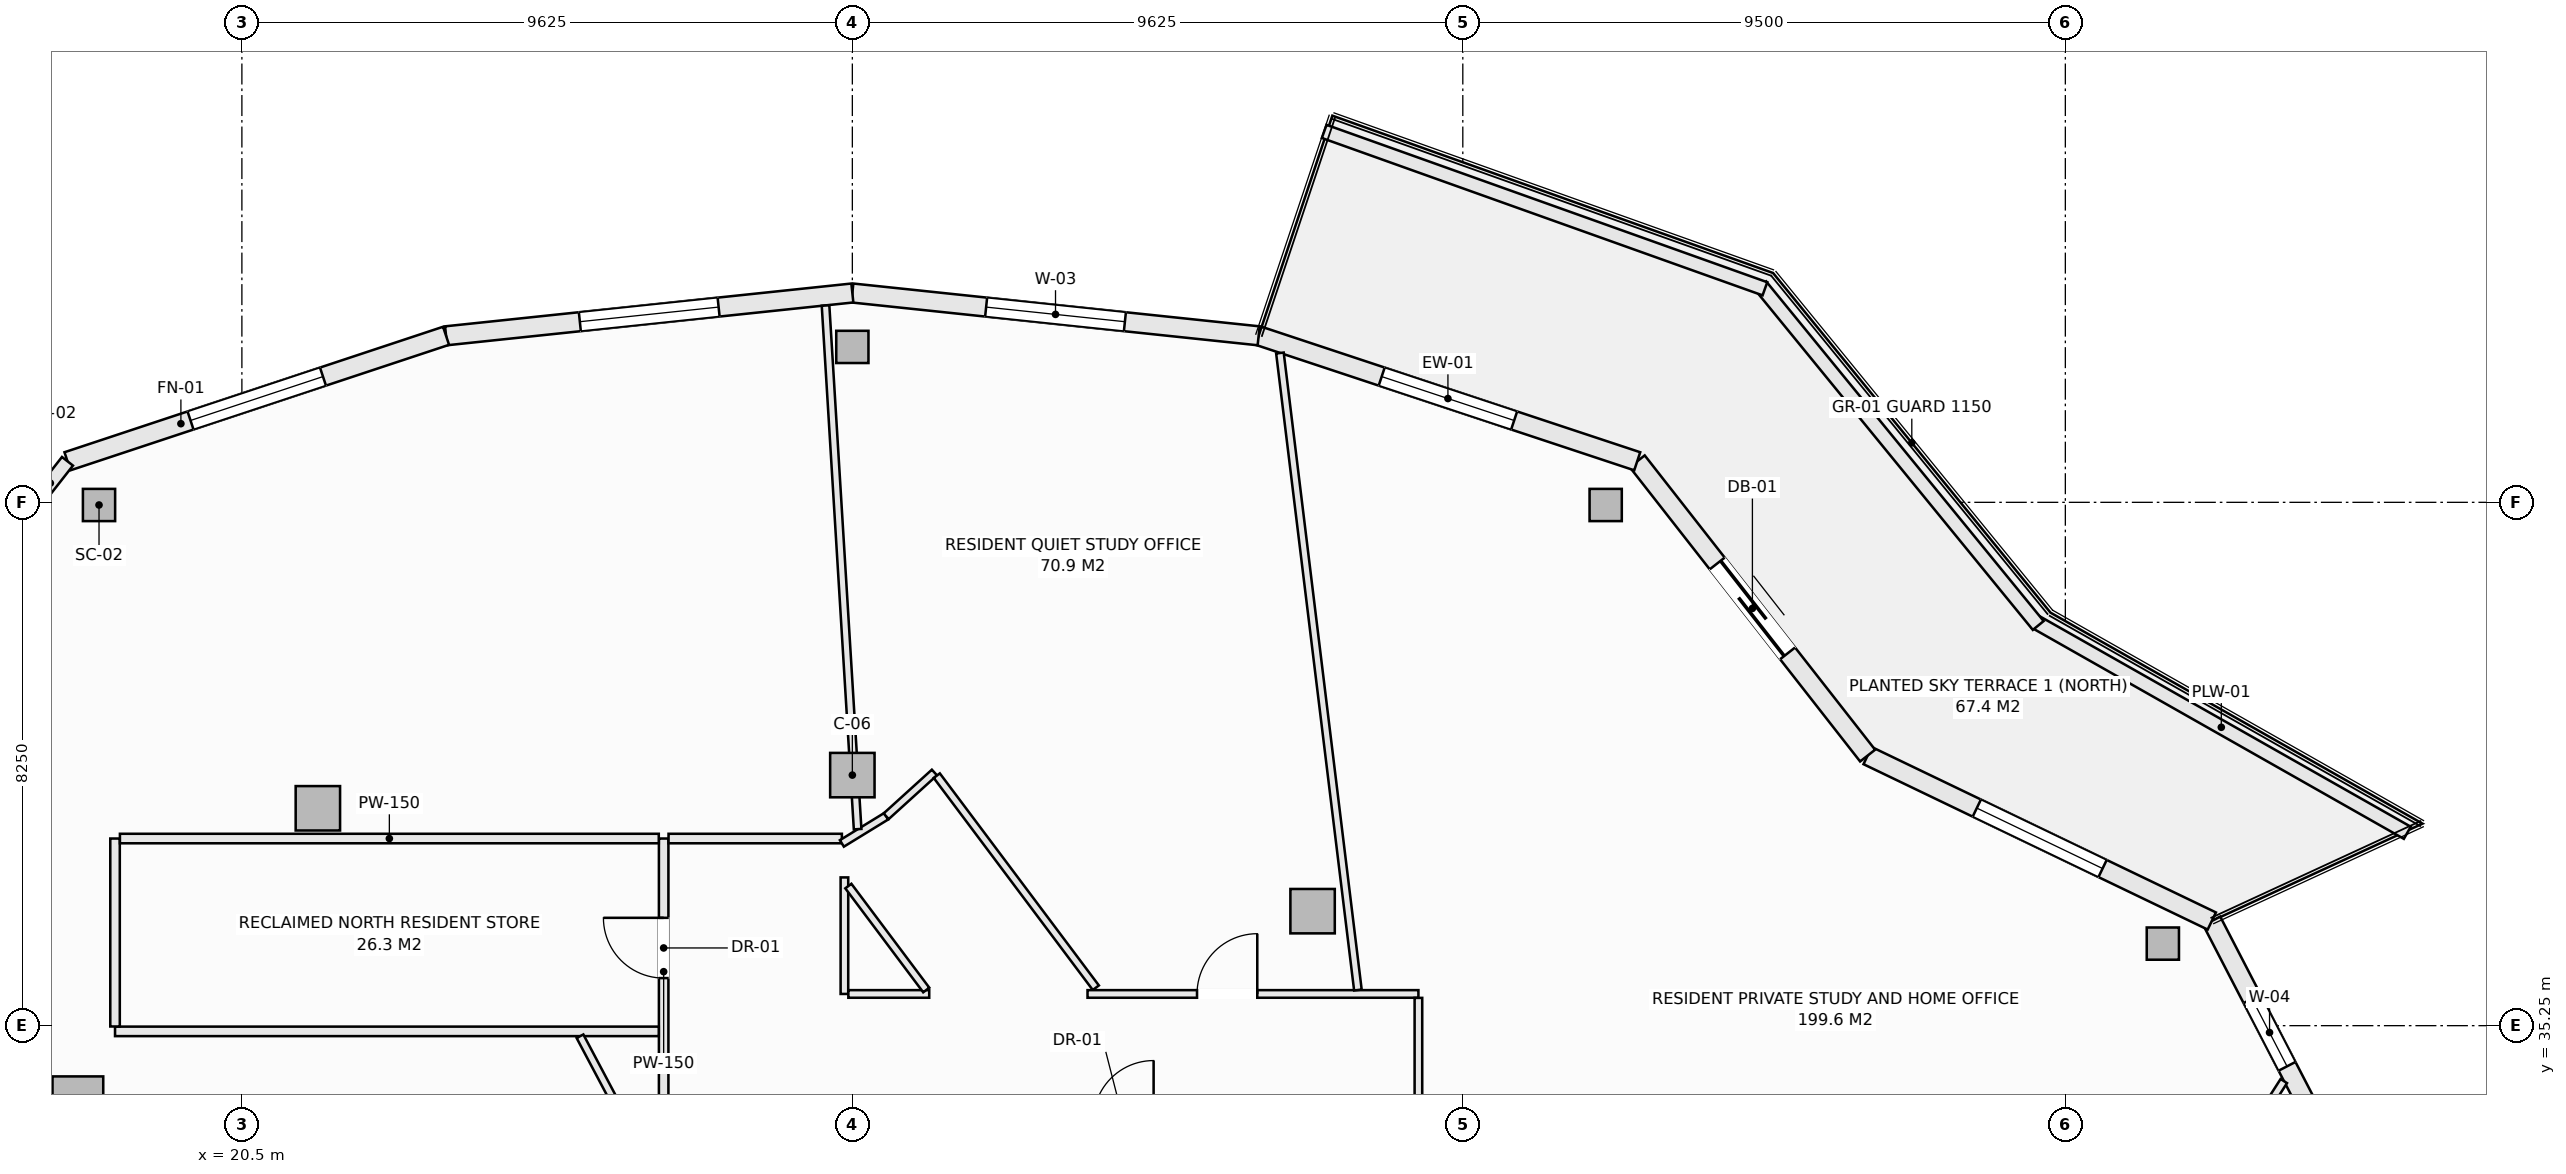
"""IFC4 building model, lengths in metres.
Left out: names, types, materials, properties, quantities, classifications, styles, units other than length and angle.
Written with IfcOpenShell. Run it as: python <this file> out.ifc"""

import sys

from ifc_helpers import new_model, si_unit, direction, frame, frame_2d, origin, origin_2d, place, context, subcontext, project, spatial, rectangle, hollow_rectangle, extrude, element, fill, save


model = new_model("IFC4")
c1 = context("Model", 3, precision=1e-05, world=origin(), true_north=direction((0.0, 1.0)))
c2 = subcontext(c1, "Body", "Model", "MODEL_VIEW")
j1 = project(units=[si_unit("LENGTHUNIT", "METRE"), si_unit("PLANEANGLEUNIT", "RADIAN")], contexts=[c1])
p1 = place(None, origin())
s1 = spatial("IfcSite", under=j1, at=p1, CompositionType="ELEMENT")
p2 = place(p1, origin())
s2 = spatial("IfcBuilding", under=s1, at=p2, CompositionType="ELEMENT")
p3 = place(p2, frame((0.0, 0.0, 212.9)))
s3 = spatial("IfcBuildingStorey", under=s2, at=p3, CompositionType="ELEMENT", Elevation=212.9)
for number, where, z_axis, x_axis in (
    (1, (50.787, 36.544, -0.27), (0.0, 0.0, 1.0), (1.0, 0.0, 0.0)),
    (2, (42.003, 43.458, -0.27), (0.0, 0.0, 1.0), (1.0, 0.0, 0.0)),
    (3, (30.125, 45.95, -0.27), (0.0, 0.0, 1.0), (1.0, 0.0, 0.0)),
    (4, (18.247, 43.458, -0.27), (0.0, 0.0, 1.0), (1.0, 0.0, 0.0)),
):
    element("IfcColumn", number, at=place(p3, frame(where, z_axis=z_axis, x_axis=x_axis)), inside=s3, PredefinedType="COLUMN", context=c2, shape_type="SweptSolid", body=[
        extrude(hollow_rectangle(XDim=0.508, YDim=0.508, WallThickness=0.019, at=origin_2d()), origin(), (0.0, 0.0, 1.0), 3.3),
    ])
for number, where, z_axis, x_axis in (
    (5, (37.382, 37.055, -0.27), (0.0, 0.0, 1.0), (1.0, 0.0, 0.0)),
    (6, (30.125, 39.2, -0.27), (0.0, 0.0, 1.0), (1.0, 0.0, 0.0)),
    (7, (21.698, 38.677, -0.27), (0.0, 0.0, 1.0), (1.0, 0.0, 0.0)),
):
    element("IfcColumn", number, at=place(p3, frame(where, z_axis=z_axis, x_axis=x_axis)), inside=s3, PredefinedType="COLUMN", context=c2, shape_type="SweptSolid", body=[
        extrude(rectangle(XDim=0.7, YDim=0.7, at=origin_2d()), origin(), (0.0, 0.0, 1.0), 3.3),
    ])
p4 = place(p3, frame((17.914, 34.05, -0.27), z_axis=(0.0, 0.0, 1.0), x_axis=(1.0, 0.0, 0.0)))
e8 = element("IfcColumn", 8, at=p4, inside=s3, PredefinedType="PILASTER", context=c2, shape_type="SweptSolid", body=[
    extrude(rectangle(XDim=0.8, YDim=0.8, at=origin_2d()), origin(), (0.0, 0.0, 1.0), 3.3),
])
p5 = place(p3, frame((51.559, 36.9, 0.0), z_axis=(0.0, 0.0, 1.0), x_axis=(0.459808219482, -0.888018243786, 0.0)))
e9 = element("IfcWall", 9, at=p5, inside=s3, PredefinedType="SOLIDWALL", context=c2, shape_type="SweptSolid", body=[
    extrude(rectangle(XDim=5.378, YDim=0.3, at=frame_2d((2.689, 0.0))), origin(), (0.0, 0.0, 1.0), 2.605),
])
p6 = place(p5, frame((1.38, 0.0, 0.72)))
e10 = element("IfcOpeningElement", 10, at=p6, cuts=e9, PredefinedType="OPENING", context=c2, shape_type="SweptSolid", body=[
    extrude(rectangle(XDim=1.2, YDim=1.65, at=frame_2d((0.6, 0.825))), frame((0.0, 0.16, 0.0), z_axis=(0.0, -1.0, 0.0), x_axis=(1.0, 0.0, 0.0)), (0.0, 0.0, 1.0), 0.32),
])
p7 = place(p3, frame((46.133, 39.507, 0.0), z_axis=(0.0, 0.0, 1.0), x_axis=(0.901348331142, -0.433094892545, 0.0)))
e11 = element("IfcWall", 11, at=p7, inside=s3, PredefinedType="SOLIDWALL", context=c2, shape_type="SweptSolid", body=[
    extrude(rectangle(XDim=6.021, YDim=0.3, at=frame_2d((3.01, 0.0))), origin(), (0.0, 0.0, 1.0), 2.605),
])
p8 = place(p7, frame((1.91, 0.0, 0.72)))
e12 = element("IfcOpeningElement", 12, at=p8, cuts=e11, PredefinedType="OPENING", context=c2, shape_type="SweptSolid", body=[
    extrude(rectangle(XDim=2.2, YDim=1.65, at=frame_2d((1.1, 0.825))), frame((0.0, 0.16, 0.0), z_axis=(0.0, -1.0, 0.0), x_axis=(1.0, 0.0, 0.0)), (0.0, 0.0, 1.0), 0.32),
])
p9 = place(p3, frame((42.5, 44.147, 0.0), z_axis=(0.0, 0.0, 1.0), x_axis=(0.616450126935, -0.787393955401, 0.0)))
e13 = element("IfcWall", 13, at=p9, inside=s3, PredefinedType="SOLIDWALL", context=c2, shape_type="SweptSolid", body=[
    extrude(rectangle(XDim=5.893, YDim=0.3, at=frame_2d((2.946, 0.0))), origin(), (0.0, 0.0, 1.0), 2.605),
])
p10 = place(p9, frame((2.046, 0.0, 0.0)))
e14 = element("IfcOpeningElement", 14, at=p10, cuts=e13, PredefinedType="OPENING", context=c2, shape_type="SweptSolid", body=[
    extrude(rectangle(XDim=1.8, YDim=2.25, at=frame_2d((0.9, 1.125))), frame((0.0, 0.16, 0.0), z_axis=(0.0, -1.0, 0.0), x_axis=(1.0, 0.0, 0.0)), (0.0, 0.0, 1.0), 0.32),
])
p11 = place(p3, frame((36.531, 46.125, 0.0), z_axis=(0.0, 0.0, 1.0), x_axis=(0.949240877604, -0.314550085495, 0.0)))
e15 = element("IfcWall", 15, at=p11, inside=s3, PredefinedType="SOLIDWALL", context=c2, shape_type="SweptSolid", body=[
    extrude(rectangle(XDim=6.288, YDim=0.3, at=frame_2d((3.144, 0.0))), origin(), (0.0, 0.0, 1.0), 2.605),
])
p12 = place(p11, frame((2.044, 0.0, 0.72)))
e16 = element("IfcOpeningElement", 16, at=p12, cuts=e15, PredefinedType="OPENING", context=c2, shape_type="SweptSolid", body=[
    extrude(rectangle(XDim=2.2, YDim=1.65, at=frame_2d((1.1, 0.825))), frame((0.0, 0.16, 0.0), z_axis=(0.0, -1.0, 0.0), x_axis=(1.0, 0.0, 0.0)), (0.0, 0.0, 1.0), 0.32),
])
p13 = place(p3, frame((30.125, 46.8, 0.0), z_axis=(0.0, 0.0, 1.0), x_axis=(0.994497142298, -0.104763705363, 0.0)))
e17 = element("IfcWall", 17, at=p13, inside=s3, PredefinedType="SOLIDWALL", context=c2, shape_type="SweptSolid", body=[
    extrude(rectangle(XDim=6.441, YDim=0.3, at=frame_2d((3.221, 0.0))), origin(), (0.0, 0.0, 1.0), 2.605),
])
p14 = place(p13, frame((2.121, 0.0, 0.72)))
e18 = element("IfcOpeningElement", 18, at=p14, cuts=e17, PredefinedType="OPENING", context=c2, shape_type="SweptSolid", body=[
    extrude(rectangle(XDim=2.2, YDim=1.65, at=frame_2d((1.1, 0.825))), frame((0.0, 0.16, 0.0), z_axis=(0.0, -1.0, 0.0), x_axis=(1.0, 0.0, 0.0)), (0.0, 0.0, 1.0), 0.32),
])
p15 = place(p3, frame((23.719, 46.125, 0.0), z_axis=(0.0, 0.0, 1.0), x_axis=(0.994497142298, 0.104763705363, 0.0)))
e19 = element("IfcWall", 19, at=p15, inside=s3, PredefinedType="SOLIDWALL", context=c2, shape_type="SweptSolid", body=[
    extrude(rectangle(XDim=6.441, YDim=0.3, at=frame_2d((3.221, 0.0))), origin(), (0.0, 0.0, 1.0), 2.605),
])
p16 = place(p15, frame((2.121, 0.0, 0.72)))
e20 = element("IfcOpeningElement", 20, at=p16, cuts=e19, PredefinedType="OPENING", context=c2, shape_type="SweptSolid", body=[
    extrude(rectangle(XDim=2.2, YDim=1.65, at=frame_2d((1.1, 0.825))), frame((0.0, 0.16, 0.0), z_axis=(0.0, -1.0, 0.0), x_axis=(1.0, 0.0, 0.0)), (0.0, 0.0, 1.0), 0.32),
])
p17 = place(p3, frame((17.75, 44.147, 0.0), z_axis=(0.0, 0.0, 1.0), x_axis=(0.949240877604, 0.314550085495, 0.0)))
e21 = element("IfcWall", 21, at=p17, inside=s3, PredefinedType="SOLIDWALL", context=c2, shape_type="SweptSolid", body=[
    extrude(rectangle(XDim=6.288, YDim=0.3, at=frame_2d((3.144, 0.0))), origin(), (0.0, 0.0, 1.0), 2.605),
])
p18 = place(p17, frame((2.044, 0.0, 0.72)))
e22 = element("IfcOpeningElement", 22, at=p18, cuts=e21, PredefinedType="OPENING", context=c2, shape_type="SweptSolid", body=[
    extrude(rectangle(XDim=2.2, YDim=1.65, at=frame_2d((1.1, 0.825))), frame((0.0, 0.16, 0.0), z_axis=(0.0, -1.0, 0.0), x_axis=(1.0, 0.0, 0.0)), (0.0, 0.0, 1.0), 0.32),
])
p19 = place(p3, frame((17.21, 43.458, 0.0), z_axis=(0.0, 0.0, 1.0), x_axis=(0.616466126167, 0.787381429352, 0.0)))
e23 = element("IfcWall", 23, at=p19, inside=s3, PredefinedType="SOLIDWALL", context=c2, shape_type="SweptSolid", body=[
    extrude(rectangle(XDim=0.876, YDim=0.22, at=frame_2d((0.438, 0.0))), origin(), (0.0, 0.0, 1.0), 2.605),
])
p20 = place(p3, frame((48.776, 41.617, 0.0), z_axis=(0.0, 0.0, 1.0), x_axis=(0.869860619267, -0.493297580623, 0.0)))
e24 = element("IfcWall", 24, at=p20, inside=s3, PredefinedType="PARAPET", context=c2, shape_type="SweptSolid", body=[
    extrude(rectangle(XDim=6.743, YDim=0.22, at=frame_2d((3.371, 0.0))), origin(), (0.0, 0.0, 1.0), 0.52),
])
p21 = place(p3, frame((44.448, 46.913, 0.0), z_axis=(0.0, 0.0, 1.0), x_axis=(0.632697312147, -0.774399193699, 0.0)))
e25 = element("IfcWall", 25, at=p21, inside=s3, PredefinedType="PARAPET", context=c2, shape_type="SweptSolid", body=[
    extrude(rectangle(XDim=6.914, YDim=0.22, at=frame_2d((3.457, 0.0))), origin(), (0.0, 0.0, 1.0), 0.52),
])
p22 = place(p3, frame((37.565, 49.347, 0.0), z_axis=(0.0, 0.0, 1.0), x_axis=(0.941780086523, -0.336229488042, 0.0)))
e26 = element("IfcWall", 26, at=p22, inside=s3, PredefinedType="PARAPET", context=c2, shape_type="SweptSolid", body=[
    extrude(rectangle(XDim=7.378, YDim=0.22, at=frame_2d((3.689, 0.0))), origin(), (0.0, 0.0, 1.0), 0.52),
])
p23 = place(p3, frame((27.15, 34.002, 0.0), z_axis=(0.0, 0.0, 1.0), x_axis=(0.0, 1.0, 0.0)))
e27 = element("IfcWall", 27, at=p23, inside=s3, PredefinedType="PARTITIONING", context=c2, shape_type="SweptSolid", body=[
    extrude(rectangle(XDim=4.198, YDim=0.15, at=frame_2d((2.099, 0.0))), origin(), (0.0, 0.0, 1.0), 3.03),
])
p24 = place(p23, frame((1.998, 0.0, 0.0)))
e28 = element("IfcOpeningElement", 28, at=p24, cuts=e27, PredefinedType="OPENING", context=c2, shape_type="SweptSolid", body=[
    extrude(rectangle(XDim=0.95, YDim=2.1, at=frame_2d((0.475, 1.05))), frame((0.0, 0.085, 0.0), z_axis=(0.0, -1.0, 0.0), x_axis=(1.0, 0.0, 0.0)), (0.0, 0.0, 1.0), 0.17),
])
p25 = place(p3, frame((30.0, 35.75, 0.0), z_axis=(0.0, 0.0, 1.0), x_axis=(0.0, 1.0, 0.0)))
e29 = element("IfcWall", 29, at=p25, inside=s3, PredefinedType="PARTITIONING", context=c2, shape_type="SweptSolid", body=[
    extrude(rectangle(XDim=1.837, YDim=0.12, at=frame_2d((0.918, 0.0))), origin(), (0.0, 0.0, 1.0), 3.03),
])
p26 = place(p3, frame((18.5, 35.16, 0.0), z_axis=(0.0, 0.0, 1.0), x_axis=(1.0, 0.0, 0.0)))
e30 = element("IfcWall", 30, at=p26, inside=s3, PredefinedType="PARTITIONING", context=c2, shape_type="SweptSolid", body=[
    extrude(rectangle(XDim=8.573, YDim=0.15, at=frame_2d((4.287, 0.0))), origin(), (0.0, 0.0, 1.0), 3.03),
])
p27 = place(p3, frame((18.5, 35.237, 0.0), z_axis=(0.0, 0.0, 1.0), x_axis=(0.0, 1.0, 0.0)))
e31 = element("IfcWall", 31, at=p27, inside=s3, PredefinedType="PARTITIONING", context=c2, shape_type="SweptSolid", body=[
    extrude(rectangle(XDim=2.963, YDim=0.15, at=frame_2d((1.481, 0.0))), origin(), (0.0, 0.0, 1.0), 3.03),
])
p28 = place(p3, frame((18.577, 38.2, 0.0), z_axis=(0.0, 0.0, 1.0), x_axis=(1.0, 0.0, 0.0)))
e32 = element("IfcWall", 32, at=p28, inside=s3, PredefinedType="PARTITIONING", context=c2, shape_type="SweptSolid", body=[
    extrude(rectangle(XDim=8.496, YDim=0.15, at=frame_2d((4.248, 0.0))), origin(), (0.0, 0.0, 1.0), 3.03),
])
p29 = place(p3, frame((27.227, 38.2, 0.0), z_axis=(0.0, 0.0, 1.0), x_axis=(1.0, 0.0, 0.0)))
e33 = element("IfcWall", 33, at=p29, inside=s3, PredefinedType="PARTITIONING", context=c2, shape_type="SweptSolid", body=[
    extrude(rectangle(XDim=2.733, YDim=0.15, at=frame_2d((1.366, 0.0))), origin(), (0.0, 0.0, 1.0), 3.03),
])
p30 = place(p3, frame((29.96, 38.123, 0.0), z_axis=(0.0, 0.0, 1.0), x_axis=(0.852506956574, 0.522715877885, 0.0)))
e34 = element("IfcWall", 34, at=p30, inside=s3, PredefinedType="PARTITIONING", context=c2, shape_type="SweptSolid", body=[
    extrude(rectangle(XDim=0.819, YDim=0.12, at=frame_2d((0.409, 0.0))), origin(), (0.0, 0.0, 1.0), 3.03),
])
p31 = place(p3, frame((30.658, 38.551, 0.0), z_axis=(0.0, 0.0, 1.0), x_axis=(0.74084279818, 0.671678456097, 0.0)))
e35 = element("IfcWall", 35, at=p31, inside=s3, PredefinedType="PARTITIONING", context=c2, shape_type="SweptSolid", body=[
    extrude(rectangle(XDim=1.027, YDim=0.12, at=frame_2d((0.514, 0.0))), origin(), (0.0, 0.0, 1.0), 3.03),
])
p32 = place(p3, frame((31.456, 39.191, 0.0), z_axis=(0.0, 0.0, 1.0), x_axis=(0.600056078533, -0.799957938029, 0.0)))
e36 = element("IfcWall", 36, at=p32, inside=s3, PredefinedType="PARTITIONING", context=c2, shape_type="SweptSolid", body=[
    extrude(rectangle(XDim=4.179, YDim=0.12, at=frame_2d((2.09, 0.0))), origin(), (0.0, 0.0, 1.0), 2.478),
])
p33 = place(p3, frame((30.062, 35.75, 0.0), z_axis=(0.0, 0.0, 1.0), x_axis=(1.0, 0.0, 0.0)))
e37 = element("IfcWall", 37, at=p33, inside=s3, PredefinedType="PARTITIONING", context=c2, shape_type="SweptSolid", body=[
    extrude(rectangle(XDim=1.275, YDim=0.12, at=frame_2d((0.637, 0.0))), origin(), (0.0, 0.0, 1.0), 3.03),
])
p34 = place(p3, frame((33.833, 35.75, 0.0), z_axis=(0.0, 0.0, 1.0), x_axis=(1.0, 0.0, 0.0)))
e38 = element("IfcWall", 38, at=p34, inside=s3, PredefinedType="PARTITIONING", context=c2, shape_type="SweptSolid", body=[
    extrude(rectangle(XDim=5.217, YDim=0.12, at=frame_2d((2.608, 0.0))), origin(), (0.0, 0.0, 1.0), 2.478),
])
p35 = place(p34, frame((1.726, 0.0, 0.0)))
e39 = element("IfcOpeningElement", 39, at=p35, cuts=e38, PredefinedType="OPENING", context=c2, shape_type="SweptSolid", body=[
    extrude(rectangle(XDim=0.95, YDim=2.1, at=frame_2d((0.475, 1.05))), frame((0.0, 0.07, 0.0), z_axis=(0.0, -1.0, 0.0), x_axis=(1.0, 0.0, 0.0)), (0.0, 0.0, 1.0), 0.14),
])
p36 = place(p3, frame((39.05, 33.75, 0.0), z_axis=(0.0, 0.0, 1.0), x_axis=(0.0, 1.0, 0.0)))
e40 = element("IfcWall", 40, at=p36, inside=s3, PredefinedType="PARTITIONING", context=c2, shape_type="SweptSolid", body=[
    extrude(rectangle(XDim=1.938, YDim=0.12, at=frame_2d((0.969, 0.0))), origin(), (0.0, 0.0, 1.0), 3.03),
])
p37 = place(p3, frame((30.062, 37.451, 0.0), z_axis=(0.0, 0.0, 1.0), x_axis=(0.599790195836, -0.800157310145, 0.0)))
e41 = element("IfcWall", 41, at=p37, inside=s3, PredefinedType="PARTITIONING", context=c2, shape_type="SweptSolid", body=[
    extrude(rectangle(XDim=2.048, YDim=0.12, at=frame_2d((1.024, 0.0))), origin(), (0.0, 0.0, 1.0), 3.03),
])
p38 = place(p3, frame((29.702, 46.603, 0.0), z_axis=(0.0, 0.0, 1.0), x_axis=(0.06113767321, -0.998129342778, 0.0)))
e42 = element("IfcWall", 42, at=p38, inside=s3, PredefinedType="PARTITIONING", context=c2, shape_type="SweptSolid", body=[
    extrude(rectangle(XDim=8.27, YDim=0.12, at=frame_2d((4.135, 0.0))), origin(), (0.0, 0.0, 1.0), 2.77),
])
p39 = place(p3, frame((42.542, 18.512, 0.0), z_axis=(0.0, 0.0, 1.0), x_axis=(0.538988222434, 0.842313300428, 0.0)))
e43 = element("IfcWall", 43, at=p39, inside=s3, PredefinedType="PARTITIONING", context=c2, shape_type="SweptSolid", body=[
    extrude(rectangle(XDim=18.835, YDim=0.12, at=frame_2d((9.417, 0.0))), origin(), (0.0, 0.0, 1.0), 3.03),
])
p40 = place(p3, frame((36.866, 45.854, 0.0), z_axis=(0.0, 0.0, 1.0), x_axis=(0.12152760456, -0.99258805218, 0.0)))
e44 = element("IfcWall", 44, at=p40, inside=s3, PredefinedType="PARTITIONING", context=c2, shape_type="SweptSolid", body=[
    extrude(rectangle(XDim=10.117, YDim=0.12, at=frame_2d((5.059, 0.0))), origin(), (0.0, 0.0, 1.0), 2.478),
])
p41 = place(p3, frame((25.831, 35.083, 0.0), z_axis=(0.0, 0.0, 1.0), x_axis=(0.468630025993, -0.883394531757, 0.0)))
e45 = element("IfcWall", 45, at=p41, inside=s3, PredefinedType="PARTITIONING", context=c2, shape_type="SweptSolid", body=[
    extrude(rectangle(XDim=1.224, YDim=0.12, at=frame_2d((0.612, 0.0))), origin(), (0.0, 0.0, 1.0), 3.03),
])
p42 = place(p6, origin())
e46 = element("IfcWindow", 46, at=p42, inside=s3, PartitioningType="SINGLE_PANEL", PredefinedType="WINDOW", context=c2, shape_type="SweptSolid", body=[
    extrude(rectangle(XDim=1.2, YDim=1.65, at=frame_2d((0.6, 0.825))), frame((0.0, 0.03, 0.0), z_axis=(0.0, -1.0, 0.0), x_axis=(1.0, 0.0, 0.0)), (0.0, 0.0, 1.0), 0.06),
])
fill(e10, e46)
p43 = place(p8, origin())
e47 = element("IfcWindow", 47, at=p43, inside=s3, PartitioningType="SINGLE_PANEL", PredefinedType="WINDOW", context=c2, shape_type="SweptSolid", body=[
    extrude(rectangle(XDim=2.2, YDim=1.65, at=frame_2d((1.1, 0.825))), frame((0.0, 0.03, 0.0), z_axis=(0.0, -1.0, 0.0), x_axis=(1.0, 0.0, 0.0)), (0.0, 0.0, 1.0), 0.06),
])
fill(e12, e47)
p44 = place(p10, origin())
e48 = element("IfcDoor", 48, at=p44, inside=s3, OperationType="SLIDING_TO_LEFT", PredefinedType="DOOR", context=c2, shape_type="SweptSolid", body=[
    extrude(rectangle(XDim=1.8, YDim=2.25, at=frame_2d((0.9, 1.125))), frame((0.0, 0.025, 0.0), z_axis=(0.0, -1.0, 0.0), x_axis=(1.0, 0.0, 0.0)), (0.0, 0.0, 1.0), 0.05),
])
fill(e14, e48)
p45 = place(p12, origin())
e49 = element("IfcWindow", 49, at=p45, inside=s3, PartitioningType="SINGLE_PANEL", PredefinedType="WINDOW", context=c2, shape_type="SweptSolid", body=[
    extrude(rectangle(XDim=2.2, YDim=1.65, at=frame_2d((1.1, 0.825))), frame((0.0, 0.03, 0.0), z_axis=(0.0, -1.0, 0.0), x_axis=(1.0, 0.0, 0.0)), (0.0, 0.0, 1.0), 0.06),
])
fill(e16, e49)
p46 = place(p14, origin())
e50 = element("IfcWindow", 50, at=p46, inside=s3, PartitioningType="SINGLE_PANEL", PredefinedType="WINDOW", context=c2, shape_type="SweptSolid", body=[
    extrude(rectangle(XDim=2.2, YDim=1.65, at=frame_2d((1.1, 0.825))), frame((0.0, 0.03, 0.0), z_axis=(0.0, -1.0, 0.0), x_axis=(1.0, 0.0, 0.0)), (0.0, 0.0, 1.0), 0.06),
])
fill(e18, e50)
p47 = place(p16, origin())
e51 = element("IfcWindow", 51, at=p47, inside=s3, PartitioningType="SINGLE_PANEL", PredefinedType="WINDOW", context=c2, shape_type="SweptSolid", body=[
    extrude(rectangle(XDim=2.2, YDim=1.65, at=frame_2d((1.1, 0.825))), frame((0.0, 0.03, 0.0), z_axis=(0.0, -1.0, 0.0), x_axis=(1.0, 0.0, 0.0)), (0.0, 0.0, 1.0), 0.06),
])
fill(e20, e51)
p48 = place(p18, origin())
e52 = element("IfcWindow", 52, at=p48, inside=s3, PartitioningType="SINGLE_PANEL", PredefinedType="WINDOW", context=c2, shape_type="SweptSolid", body=[
    extrude(rectangle(XDim=2.2, YDim=1.65, at=frame_2d((1.1, 0.825))), frame((0.0, 0.03, 0.0), z_axis=(0.0, -1.0, 0.0), x_axis=(1.0, 0.0, 0.0)), (0.0, 0.0, 1.0), 0.06),
])
fill(e22, e52)
p49 = place(p24, origin())
e53 = element("IfcDoor", 53, at=p49, inside=s3, OperationType="SINGLE_SWING_RIGHT", PredefinedType="DOOR", context=c2, shape_type="SweptSolid", body=[
    extrude(rectangle(XDim=0.95, YDim=2.1, at=frame_2d((0.475, 1.05))), frame((0.0, 0.025, 0.0), z_axis=(0.0, -1.0, 0.0), x_axis=(1.0, 0.0, 0.0)), (0.0, 0.0, 1.0), 0.05),
])
fill(e28, e53)
p50 = place(p35, origin())
e54 = element("IfcDoor", 54, at=p50, inside=s3, OperationType="SINGLE_SWING_RIGHT", PredefinedType="DOOR", context=c2, shape_type="SweptSolid", body=[
    extrude(rectangle(XDim=0.95, YDim=2.1, at=frame_2d((0.475, 1.05))), frame((0.0, 0.025, 0.0), z_axis=(0.0, -1.0, 0.0), x_axis=(1.0, 0.0, 0.0)), (0.0, 0.0, 1.0), 0.05),
])
fill(e39, e54)
save(model, sys.argv[1])
